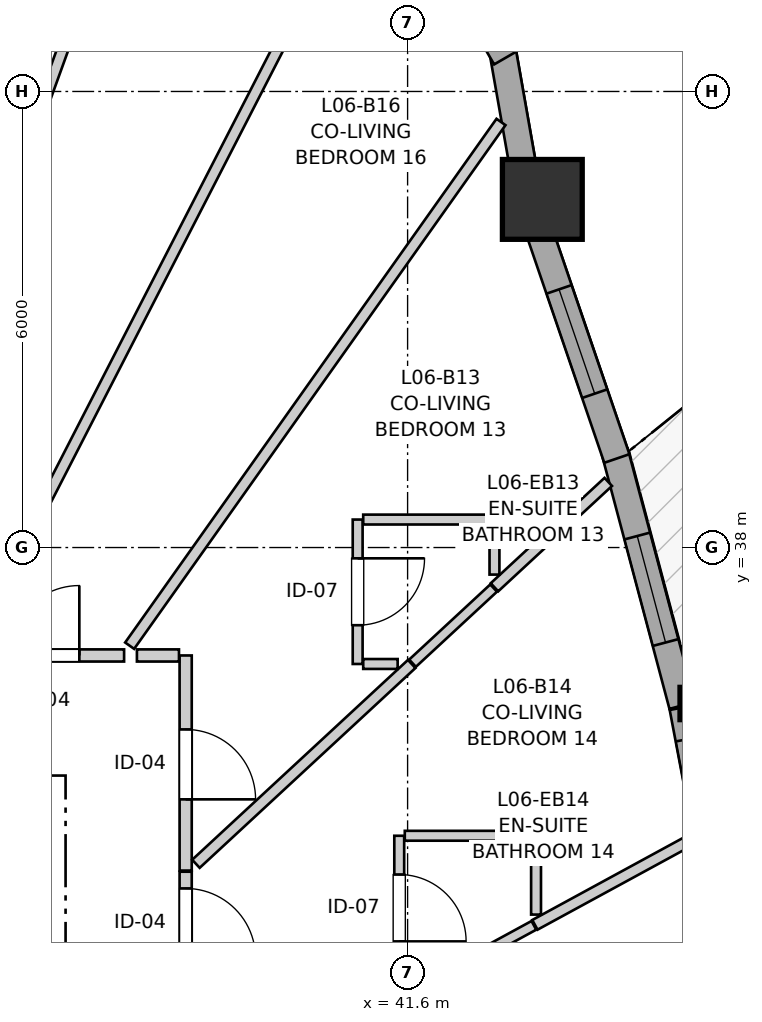
"""IFC4 building model, lengths in metres.
Left out: names, types, materials, properties, quantities, classifications, styles, units other than length and angle.
Written with IfcOpenShell. Run it as: python <this file> out.ifc"""

import sys

from ifc_helpers import new_model, si_unit, direction, frame, frame_2d, origin, origin_2d, place, context, subcontext, project, spatial, rectangle, i_section, extrude, source, transform, mapped, element, fill, save


model = new_model("IFC4")
c1 = context("Model", 3, precision=1e-05, world=origin(), true_north=direction((0.0, 1.0)))
c2 = subcontext(c1, "Body", "Model", "MODEL_VIEW")
j1 = project(units=[si_unit("LENGTHUNIT", "METRE"), si_unit("PLANEANGLEUNIT", "RADIAN")], contexts=[c1])
p1 = place(None, origin())
s1 = spatial("IfcSite", under=j1, at=p1, CompositionType="ELEMENT")
p2 = place(p1, origin())
s2 = spatial("IfcBuilding", under=s1, at=p2, CompositionType="ELEMENT")
p3 = place(p2, frame((0.0, 0.0, 23.8)))
s3 = spatial("IfcBuildingStorey", under=s2, at=p3, CompositionType="ELEMENT", Elevation=23.8)
m1 = source(origin(), c2, "Body", "SweptSolid", [
    extrude(i_section(OverallWidth=0.409, OverallDepth=0.425, WebThickness=0.03, FlangeThickness=0.048, FilletRadius=0.015, at=origin_2d()), origin(), (0.0, 0.0, 1.0), 2.935),
])
p4 = place(p3, frame((45.389, 35.948, 0.0), z_axis=(0.0, 0.0, 1.0), x_axis=(1.0, 0.0, 0.0)))
e1 = element("IfcColumn", 1, at=p4, inside=s3, PredefinedType="PILASTER", context=c2, shape_type="MappedRepresentation", body=[
    mapped(m1, transform((0.0, 0.0, 0.0), x_axis=(1.0, 0.0, 0.0), y_axis=(0.0, 1.0, 0.0), z_axis=(0.0, 0.0, 1.0), scale=1.0)),
])
m2 = source(origin(), c2, "Body", "SweptSolid", [
    extrude(rectangle(XDim=1.05, YDim=1.05, at=origin_2d()), origin(), (0.0, 0.0, 1.0), 2.935),
])
p5 = place(p3, frame((43.373, 42.58, 0.0), z_axis=(0.0, 0.0, 1.0), x_axis=(1.0, 0.0, 0.0)))
e2 = element("IfcColumn", 2, at=p5, inside=s3, PredefinedType="COLUMN", context=c2, shape_type="MappedRepresentation", body=[
    mapped(m2, transform((0.0, 0.0, 0.0), x_axis=(1.0, 0.0, 0.0), y_axis=(0.0, 1.0, 0.0), z_axis=(0.0, 0.0, 1.0), scale=1.0)),
])
p6 = place(p3, frame((45.854, 32.562, 0.0), z_axis=(0.0, 0.0, 1.0), x_axis=(-0.186698837055, 0.982417194598, 0.0)))
e3 = element("IfcWall", 3, at=p6, inside=s3, PredefinedType="SOLIDWALL", context=c2, shape_type="SweptSolid", body=[
    extrude(rectangle(XDim=3.393, YDim=0.35, at=frame_2d((1.697, 0.0))), origin(), (0.0, 0.0, 1.0), 2.415),
])
p7 = place(p6, frame((1.721, 0.0, 0.82)))
e4 = element("IfcOpeningElement", 4, at=p7, cuts=e3, PredefinedType="OPENING", context=c2, shape_type="SweptSolid", body=[
    extrude(rectangle(XDim=1.25, YDim=1.35, at=frame_2d((0.625, 0.675))), frame((0.0, 0.185, 0.0), z_axis=(0.0, -1.0, 0.0), x_axis=(1.0, 0.0, 0.0)), (0.0, 0.0, 1.0), 0.37),
])
p8 = place(p3, frame((45.214, 35.922, 0.0), z_axis=(0.0, 0.0, 1.0), x_axis=(-0.257081073508, 0.966389839373, 0.0)))
e5 = element("IfcWall", 5, at=p8, inside=s3, PredefinedType="SOLIDWALL", context=c2, shape_type="SweptSolid", body=[
    extrude(rectangle(XDim=3.449, YDim=0.35, at=frame_2d((1.725, 0.0))), origin(), (0.0, 0.0, 1.0), 2.415),
])
p9 = place(p8, frame((0.857, 0.0, 0.82)))
e6 = element("IfcOpeningElement", 6, at=p9, cuts=e5, PredefinedType="OPENING", context=c2, shape_type="SweptSolid", body=[
    extrude(rectangle(XDim=1.45, YDim=1.25, at=frame_2d((0.725, 0.625))), frame((0.0, 0.185, 0.0), z_axis=(0.0, -1.0, 0.0), x_axis=(1.0, 0.0, 0.0)), (0.0, 0.0, 1.0), 0.37),
])
p10 = place(p3, frame((44.353, 39.171, 0.0), z_axis=(0.0, 0.0, 1.0), x_axis=(-0.323604310653, 0.946192501623, 0.0)))
e7 = element("IfcWall", 7, at=p10, inside=s3, PredefinedType="SOLIDWALL", context=c2, shape_type="SweptSolid", body=[
    extrude(rectangle(XDim=3.243, YDim=0.35, at=frame_2d((1.621, 0.0))), origin(), (0.0, 0.0, 1.0), 2.415),
])
p11 = place(p10, frame((0.901, 0.0, 0.82)))
e8 = element("IfcOpeningElement", 8, at=p11, cuts=e7, PredefinedType="OPENING", context=c2, shape_type="SweptSolid", body=[
    extrude(rectangle(XDim=1.45, YDim=1.25, at=frame_2d((0.725, 0.625))), frame((0.0, 0.185, 0.0), z_axis=(0.0, -1.0, 0.0), x_axis=(1.0, 0.0, 0.0)), (0.0, 0.0, 1.0), 0.37),
])
p12 = place(p3, frame((43.148, 42.845, 0.0), z_axis=(0.0, 0.0, 1.0), x_axis=(-0.173745591742, 0.984790571315, 0.0)))
e9 = element("IfcWall", 9, at=p12, inside=s3, PredefinedType="SOLIDWALL", context=c2, shape_type="SweptSolid", body=[
    extrude(rectangle(XDim=1.752, YDim=0.35, at=frame_2d((0.876, 0.0))), origin(), (0.0, 0.0, 1.0), 2.415),
])
p13 = place(p3, frame((42.89, 44.443, 0.0), z_axis=(0.0, 0.0, 1.0), x_axis=(-0.499995423472, 0.866028046028, 0.0)))
e10 = element("IfcWall", 10, at=p13, inside=s3, PredefinedType="SOLIDWALL", context=c2, shape_type="SweptSolid", body=[
    extrude(rectangle(XDim=2.09, YDim=0.35, at=frame_2d((1.045, 0.0))), origin(), (0.0, 0.0, 1.0), 2.415),
])
p14 = place(p13, frame((0.32, 0.0, 0.82)))
e11 = element("IfcOpeningElement", 11, at=p14, cuts=e10, PredefinedType="OPENING", context=c2, shape_type="SweptSolid", body=[
    extrude(rectangle(XDim=1.45, YDim=1.25, at=frame_2d((0.725, 0.625))), frame((0.0, 0.185, 0.0), z_axis=(0.0, -1.0, 0.0), x_axis=(1.0, 0.0, 0.0)), (0.0, 0.0, 1.0), 0.37),
])
p15 = place(p3, frame((38.68, 33.735, 0.0), z_axis=(0.0, 0.0, 1.0), x_axis=(0.0, -1.0, 0.0)))
e12 = element("IfcWall", 12, at=p15, inside=s3, PredefinedType="PARTITIONING", context=c2, shape_type="SweptSolid", body=[
    extrude(rectangle(XDim=3.217, YDim=0.16, at=frame_2d((1.608, 0.0))), origin(), (0.0, 0.0, 1.0), 2.935),
])
p16 = place(p15, frame((0.22, 0.0, 0.0)))
e13 = element("IfcOpeningElement", 13, at=p16, cuts=e12, PredefinedType="OPENING", context=c2, shape_type="SweptSolid", body=[
    extrude(rectangle(XDim=0.92, YDim=2.1, at=frame_2d((0.46, 1.05))), frame((0.0, 0.09, 0.0), z_axis=(0.0, -1.0, 0.0), x_axis=(1.0, 0.0, 0.0)), (0.0, 0.0, 1.0), 0.18),
])
p17 = place(p3, frame((38.68, 36.58, 0.0), z_axis=(0.0, 0.0, 1.0), x_axis=(0.0, -1.0, 0.0)))
e14 = element("IfcWall", 14, at=p17, inside=s3, PredefinedType="PARTITIONING", context=c2, shape_type="SweptSolid", body=[
    extrude(rectangle(XDim=2.83, YDim=0.16, at=frame_2d((1.415, 0.0))), origin(), (0.0, 0.0, 1.0), 2.935),
])
p18 = place(p17, frame((0.973, 0.0, 0.0)))
e15 = element("IfcOpeningElement", 15, at=p18, cuts=e14, PredefinedType="OPENING", context=c2, shape_type="SweptSolid", body=[
    extrude(rectangle(XDim=0.92, YDim=2.1, at=frame_2d((0.46, 1.05))), frame((0.0, 0.09, 0.0), z_axis=(0.0, -1.0, 0.0), x_axis=(1.0, 0.0, 0.0)), (0.0, 0.0, 1.0), 0.18),
])
p19 = place(p3, frame((35.773, 36.58, 0.0), z_axis=(0.0, 0.0, 1.0), x_axis=(1.0, 0.0, 0.0)))
e16 = element("IfcWall", 16, at=p19, inside=s3, PredefinedType="PARTITIONING", context=c2, shape_type="SweptSolid", body=[
    extrude(rectangle(XDim=2.097, YDim=0.16, at=frame_2d((1.049, 0.0))), origin(), (0.0, 0.0, 1.0), 2.935),
])
p20 = place(p19, frame((0.588, 0.0, 0.0)))
e17 = element("IfcOpeningElement", 17, at=p20, cuts=e16, PredefinedType="OPENING", context=c2, shape_type="SweptSolid", body=[
    extrude(rectangle(XDim=0.92, YDim=2.1, at=frame_2d((0.46, 1.05))), frame((0.0, 0.09, 0.0), z_axis=(0.0, -1.0, 0.0), x_axis=(1.0, 0.0, 0.0)), (0.0, 0.0, 1.0), 0.18),
])
p21 = place(p3, frame((40.943, 38.368, 0.0), z_axis=(0.0, 0.0, 1.0), x_axis=(0.0, -1.0, 0.0)))
e18 = element("IfcWall", 18, at=p21, inside=s3, PredefinedType="PARTITIONING", context=c2, shape_type="SweptSolid", body=[
    extrude(rectangle(XDim=1.9, YDim=0.13, at=frame_2d((0.95, 0.0))), origin(), (0.0, 0.0, 1.0), 2.935),
])
p22 = place(p21, frame((0.51, 0.0, 0.0)))
e19 = element("IfcOpeningElement", 19, at=p22, cuts=e18, PredefinedType="OPENING", context=c2, shape_type="SweptSolid", body=[
    extrude(rectangle(XDim=0.88, YDim=2.05, at=frame_2d((0.44, 1.025))), frame((0.0, 0.075, 0.0), z_axis=(0.0, -1.0, 0.0), x_axis=(1.0, 0.0, 0.0)), (0.0, 0.0, 1.0), 0.15),
])
p23 = place(p3, frame((41.49, 34.208, 0.0), z_axis=(0.0, 0.0, 1.0), x_axis=(0.0, -1.0, 0.0)))
e20 = element("IfcWall", 20, at=p23, inside=s3, PredefinedType="PARTITIONING", context=c2, shape_type="SweptSolid", body=[
    extrude(rectangle(XDim=1.9, YDim=0.13, at=frame_2d((0.95, 0.0))), origin(), (0.0, 0.0, 1.0), 2.935),
])
p24 = place(p23, frame((0.51, 0.0, 0.0)))
e21 = element("IfcOpeningElement", 21, at=p24, cuts=e20, PredefinedType="OPENING", context=c2, shape_type="SweptSolid", body=[
    extrude(rectangle(XDim=0.88, YDim=2.05, at=frame_2d((0.44, 1.025))), frame((0.0, 0.075, 0.0), z_axis=(0.0, -1.0, 0.0), x_axis=(1.0, 0.0, 0.0)), (0.0, 0.0, 1.0), 0.15),
])
p25 = place(p3, frame((34.219, 36.692, 0.0), z_axis=(0.0, 0.0, 1.0), x_axis=(0.340186046968, 0.940358151689, 0.0)))
e22 = element("IfcWall", 22, at=p25, inside=s3, PredefinedType="PARTITIONING", context=c2, shape_type="SweptSolid", body=[
    extrude(rectangle(XDim=11.951, YDim=0.145, at=frame_2d((5.976, 0.0))), origin(), (0.0, 0.0, 1.0), 2.935),
])
p26 = place(p3, frame((35.852, 36.7, 0.0), z_axis=(0.0, 0.0, 1.0), x_axis=(0.457258091214, 0.889334041865, 0.0)))
e23 = element("IfcWall", 23, at=p26, inside=s3, PredefinedType="PARTITIONING", context=c2, shape_type="SweptSolid", body=[
    extrude(rectangle(XDim=11.227, YDim=0.145, at=frame_2d((5.613, 0.0))), origin(), (0.0, 0.0, 1.0), 2.935),
])
p27 = place(p3, frame((37.943, 36.708, 0.0), z_axis=(0.0, 0.0, 1.0), x_axis=(0.578429476704, 0.81573239514, 0.0)))
e24 = element("IfcWall", 24, at=p27, inside=s3, PredefinedType="PARTITIONING", context=c2, shape_type="SweptSolid", body=[
    extrude(rectangle(XDim=8.447, YDim=0.145, at=frame_2d((4.223, 0.0))), origin(), (0.0, 0.0, 1.0), 2.935),
])
p28 = place(p3, frame((38.815, 33.839, 0.0), z_axis=(0.0, 0.0, 1.0), x_axis=(0.733718730688, 0.67945332749, 0.0)))
e25 = element("IfcWall", 25, at=p28, inside=s3, PredefinedType="PARTITIONING", context=c2, shape_type="SweptSolid", body=[
    extrude(rectangle(XDim=3.869, YDim=0.145, at=frame_2d((1.935, 0.0))), origin(), (0.0, 0.0, 1.0), 2.935),
])
p29 = place(p3, frame((43.275, 33.036, 0.0), z_axis=(0.0, 0.0, 1.0), x_axis=(0.878237509553, 0.478224713721, 0.0)))
e26 = element("IfcWall", 26, at=p29, inside=s3, PredefinedType="PARTITIONING", context=c2, shape_type="SweptSolid", body=[
    extrude(rectangle(XDim=2.372, YDim=0.145, at=frame_2d((1.186, 0.0))), origin(), (0.0, 0.0, 1.0), 2.935),
])
p30 = place(p3, frame((42.743, 37.477, 0.0), z_axis=(0.0, 0.0, 1.0), x_axis=(0.73374741774, 0.679422347999, 0.0)))
e27 = element("IfcWall", 27, at=p30, inside=s3, PredefinedType="PARTITIONING", context=c2, shape_type="SweptSolid", body=[
    extrude(rectangle(XDim=2.04, YDim=0.145, at=frame_2d((1.02, 0.0))), origin(), (0.0, 0.0, 1.0), 2.935),
])
p31 = place(p3, frame((41.016, 38.368, 0.0), z_axis=(0.0, 0.0, 1.0), x_axis=(1.0, 0.0, 0.0)))
e28 = element("IfcWall", 28, at=p31, inside=s3, PredefinedType="PARTITIONING", context=c2, shape_type="SweptSolid", body=[
    extrude(rectangle(XDim=1.727, YDim=0.13, at=frame_2d((0.863, 0.0))), origin(), (0.0, 0.0, 1.0), 2.935),
])
p32 = place(p3, frame((41.563, 34.208, 0.0), z_axis=(0.0, 0.0, 1.0), x_axis=(1.0, 0.0, 0.0)))
e29 = element("IfcWall", 29, at=p32, inside=s3, PredefinedType="PARTITIONING", context=c2, shape_type="SweptSolid", body=[
    extrude(rectangle(XDim=1.727, YDim=0.13, at=frame_2d((0.864, 0.0))), origin(), (0.0, 0.0, 1.0), 2.935),
])
p33 = place(p3, frame((41.978, 32.33, 0.0), z_axis=(0.0, 0.0, 1.0), x_axis=(0.878138043068, 0.478407334097, 0.0)))
e30 = element("IfcWall", 30, at=p33, inside=s3, PredefinedType="PARTITIONING", context=c2, shape_type="SweptSolid", body=[
    extrude(rectangle(XDim=1.462, YDim=0.13, at=frame_2d((0.731, 0.0))), origin(), (0.0, 0.0, 1.0), 2.935),
])
p34 = place(p3, frame((41.665, 36.478, 0.0), z_axis=(0.0, 0.0, 1.0), x_axis=(0.733534386117, 0.679652340821, 0.0)))
e31 = element("IfcWall", 31, at=p34, inside=s3, PredefinedType="PARTITIONING", context=c2, shape_type="SweptSolid", body=[
    extrude(rectangle(XDim=1.454, YDim=0.13, at=frame_2d((0.727, 0.0))), origin(), (0.0, 0.0, 1.0), 2.935),
])
p35 = place(p3, frame((43.29, 33.171, 0.0), z_axis=(0.0, 0.0, 1.0), x_axis=(0.0, 1.0, 0.0)))
e32 = element("IfcWall", 32, at=p35, inside=s3, PredefinedType="PARTITIONING", context=c2, shape_type="SweptSolid", body=[
    extrude(rectangle(XDim=0.964, YDim=0.13, at=frame_2d((0.482, 0.0))), origin(), (0.0, 0.0, 1.0), 2.935),
])
p36 = place(p3, frame((42.743, 37.644, 0.0), z_axis=(0.0, 0.0, 1.0), x_axis=(0.0, 1.0, 0.0)))
e33 = element("IfcWall", 33, at=p36, inside=s3, PredefinedType="PARTITIONING", context=c2, shape_type="SweptSolid", body=[
    extrude(rectangle(XDim=0.651, YDim=0.13, at=frame_2d((0.325, 0.0))), origin(), (0.0, 0.0, 1.0), 2.935),
])
p37 = place(p3, frame((38.039, 36.58, 0.0), z_axis=(0.0, 0.0, 1.0), x_axis=(1.0, 0.0, 0.0)))
e34 = element("IfcWall", 34, at=p37, inside=s3, PredefinedType="PARTITIONING", context=c2, shape_type="SweptSolid", body=[
    extrude(rectangle(XDim=0.553, YDim=0.16, at=frame_2d((0.277, 0.0))), origin(), (0.0, 0.0, 1.0), 2.935),
])
p38 = place(p3, frame((41.016, 36.468, 0.0), z_axis=(0.0, 0.0, 1.0), x_axis=(1.0, 0.0, 0.0)))
e35 = element("IfcWall", 35, at=p38, inside=s3, PredefinedType="PARTITIONING", context=c2, shape_type="SweptSolid", body=[
    extrude(rectangle(XDim=0.453, YDim=0.13, at=frame_2d((0.227, 0.0))), origin(), (0.0, 0.0, 1.0), 2.935),
])
m3 = source(origin(), c2, "Body", "SweptSolid", [
    extrude(rectangle(XDim=1.45, YDim=1.25, at=frame_2d((0.725, 0.625))), frame((0.0, 0.03, 0.0), z_axis=(0.0, -1.0, 0.0), x_axis=(1.0, 0.0, 0.0)), (0.0, 0.0, 1.0), 0.06),
])
p39 = place(p9, origin())
e36 = element("IfcWindow", 36, at=p39, inside=s3, PartitioningType="SINGLE_PANEL", PredefinedType="WINDOW", context=c2, shape_type="MappedRepresentation", body=[
    mapped(m3, transform((0.0, 0.0, 0.0), x_axis=(1.0, 0.0, 0.0), y_axis=(0.0, 1.0, 0.0), z_axis=(0.0, 0.0, 1.0), scale=1.0)),
])
fill(e6, e36)
p40 = place(p11, origin())
e37 = element("IfcWindow", 37, at=p40, inside=s3, PartitioningType="SINGLE_PANEL", PredefinedType="WINDOW", context=c2, shape_type="MappedRepresentation", body=[
    mapped(m3, transform((0.0, 0.0, 0.0), x_axis=(1.0, 0.0, 0.0), y_axis=(0.0, 1.0, 0.0), z_axis=(0.0, 0.0, 1.0), scale=1.0)),
])
fill(e8, e37)
m4 = source(origin(), c2, "Body", "SweptSolid", [
    extrude(rectangle(XDim=0.92, YDim=2.1, at=frame_2d((0.46, 1.05))), frame((0.0, 0.025, 0.0), z_axis=(0.0, -1.0, 0.0), x_axis=(1.0, 0.0, 0.0)), (0.0, 0.0, 1.0), 0.05),
])
p41 = place(p16, origin())
e38 = element("IfcDoor", 38, at=p41, inside=s3, OperationType="SINGLE_SWING_RIGHT", PredefinedType="DOOR", context=c2, shape_type="MappedRepresentation", body=[
    mapped(m4, transform((0.0, 0.0, 0.0), x_axis=(1.0, 0.0, 0.0), y_axis=(0.0, 1.0, 0.0), z_axis=(0.0, 0.0, 1.0), scale=1.0)),
])
fill(e13, e38)
p42 = place(p18, origin())
e39 = element("IfcDoor", 39, at=p42, inside=s3, OperationType="SINGLE_SWING_RIGHT", PredefinedType="DOOR", context=c2, shape_type="MappedRepresentation", body=[
    mapped(m4, transform((0.0, 0.0, 0.0), x_axis=(1.0, 0.0, 0.0), y_axis=(0.0, 1.0, 0.0), z_axis=(0.0, 0.0, 1.0), scale=1.0)),
])
fill(e15, e39)
p43 = place(p20, origin())
e40 = element("IfcDoor", 40, at=p43, inside=s3, OperationType="SINGLE_SWING_RIGHT", PredefinedType="DOOR", context=c2, shape_type="MappedRepresentation", body=[
    mapped(m4, transform((0.0, 0.0, 0.0), x_axis=(1.0, 0.0, 0.0), y_axis=(0.0, 1.0, 0.0), z_axis=(0.0, 0.0, 1.0), scale=1.0)),
])
fill(e17, e40)
m5 = source(origin(), c2, "Body", "SweptSolid", [
    extrude(rectangle(XDim=0.88, YDim=2.05, at=frame_2d((0.44, 1.025))), frame((0.0, 0.025, 0.0), z_axis=(0.0, -1.0, 0.0), x_axis=(1.0, 0.0, 0.0)), (0.0, 0.0, 1.0), 0.05),
])
p44 = place(p22, origin())
e41 = element("IfcDoor", 41, at=p44, inside=s3, OperationType="SINGLE_SWING_LEFT", PredefinedType="DOOR", context=c2, shape_type="MappedRepresentation", body=[
    mapped(m5, transform((0.0, 0.0, 0.0), x_axis=(1.0, 0.0, 0.0), y_axis=(0.0, 1.0, 0.0), z_axis=(0.0, 0.0, 1.0), scale=1.0)),
])
fill(e19, e41)
p45 = place(p24, origin())
e42 = element("IfcDoor", 42, at=p45, inside=s3, OperationType="SINGLE_SWING_RIGHT", PredefinedType="DOOR", context=c2, shape_type="MappedRepresentation", body=[
    mapped(m5, transform((0.0, 0.0, 0.0), x_axis=(1.0, 0.0, 0.0), y_axis=(0.0, 1.0, 0.0), z_axis=(0.0, 0.0, 1.0), scale=1.0)),
])
fill(e21, e42)
save(model, sys.argv[1])
